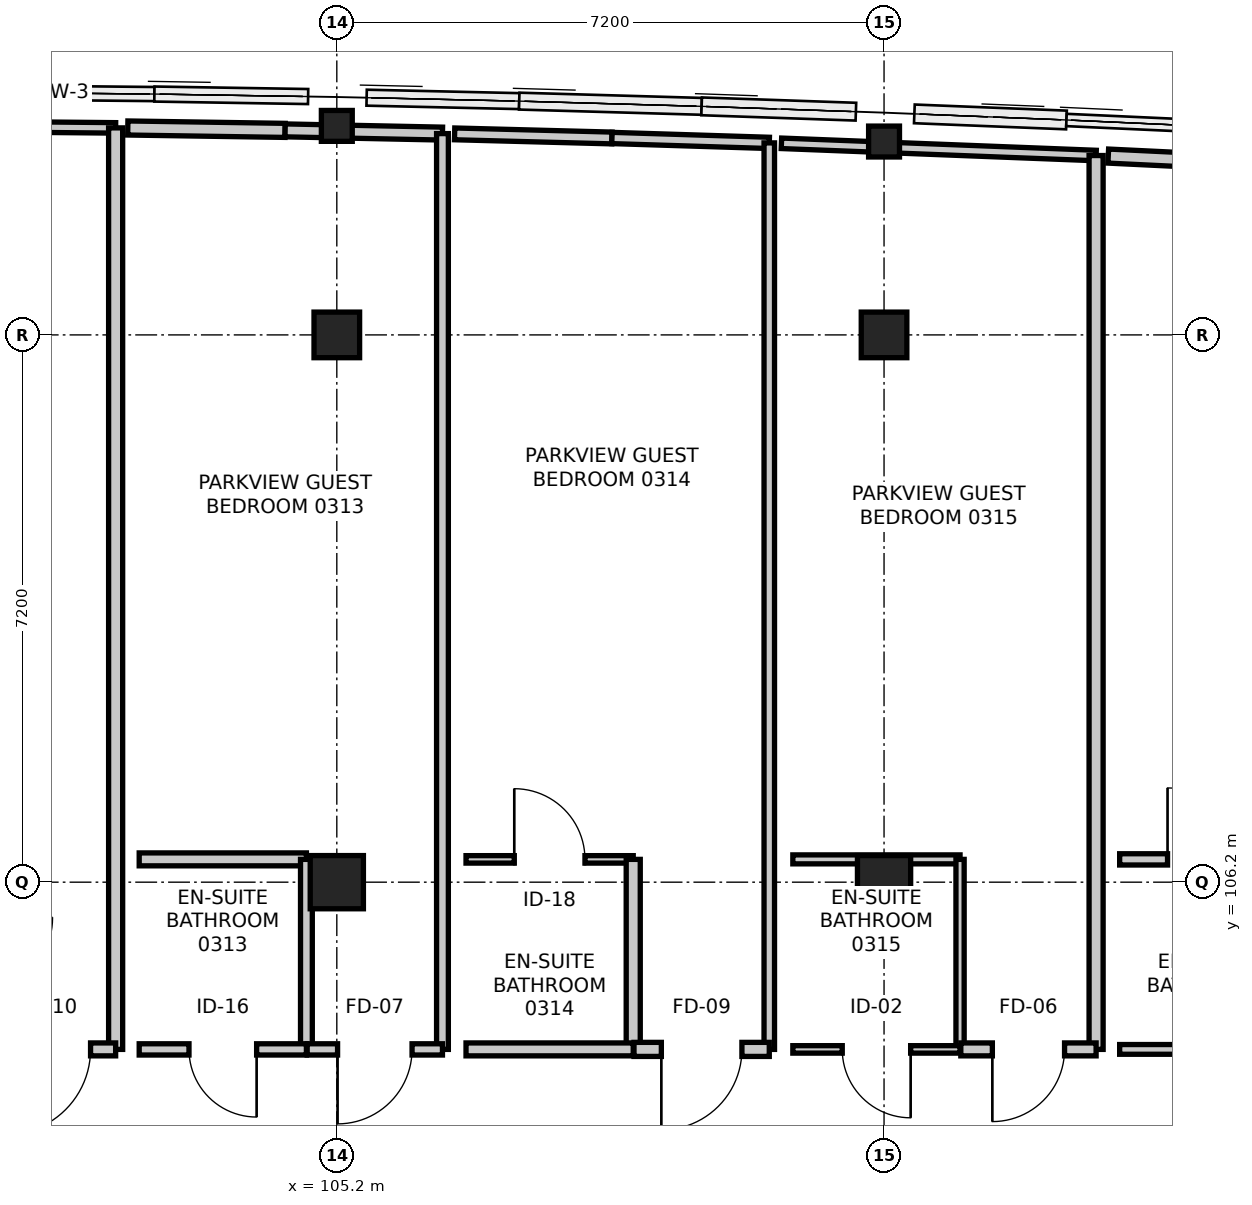
"""IFC4 building model, lengths in metres.
Left out: names, types, materials, properties, quantities, classifications, styles, units other than length and angle.
Written with IfcOpenShell. Run it as: python <this file> out.ifc"""

import sys

from ifc_helpers import new_model, si_unit, direction, frame, frame_2d, origin, origin_2d, place, context, subcontext, project, spatial, rectangle, hollow_circle, extrude, element, fill, save


model = new_model("IFC4")
c1 = context("Model", 3, precision=1e-05, world=origin(), true_north=direction((0.0, 1.0)))
c2 = subcontext(c1, "Body", "Model", "MODEL_VIEW")
j1 = project(units=[si_unit("LENGTHUNIT", "METRE"), si_unit("PLANEANGLEUNIT", "RADIAN")], contexts=[c1])
p1 = place(None, origin())
s1 = spatial("IfcSite", under=j1, at=p1, CompositionType="ELEMENT")
p2 = place(p1, origin())
s2 = spatial("IfcBuilding", under=s1, at=p2, CompositionType="ELEMENT")
p3 = place(p2, frame((0.0, 0.0, 15.0)))
s3 = spatial("IfcBuildingStorey", under=s2, at=p3, CompositionType="ELEMENT", Elevation=15.0)
p4 = place(p3, frame((105.2, 106.2, 0.0), z_axis=(0.0, 0.0, 1.0), x_axis=(1.0, 0.0, 0.0)))
e1 = element("IfcColumn", 1, at=p4, inside=s3, PredefinedType="COLUMN", context=c2, shape_type="SweptSolid", body=[
    extrude(rectangle(XDim=0.7, YDim=0.7, at=origin_2d()), origin(), (0.0, 0.0, 1.0), 4.2),
])
p5 = place(p3, frame((105.2, 113.4, 0.0), z_axis=(0.0, 0.0, 1.0), x_axis=(1.0, 0.0, 0.0)))
e2 = element("IfcColumn", 2, at=p5, inside=s3, PredefinedType="COLUMN", context=c2, shape_type="SweptSolid", body=[
    extrude(rectangle(XDim=0.6, YDim=0.6, at=origin_2d()), origin(), (0.0, 0.0, 1.0), 4.2),
])
p6 = place(p3, frame((105.2, 116.15, 0.0), z_axis=(0.0, 0.0, 1.0), x_axis=(1.0, 0.0, 0.0)))
e3 = element("IfcColumn", 3, at=p6, inside=s3, PredefinedType="COLUMN", context=c2, shape_type="SweptSolid", body=[
    extrude(hollow_circle(Radius=0.203, WallThickness=0.02, at=origin_2d()), origin(), (0.0, 0.0, 1.0), 4.2),
])
p7 = place(p3, frame((112.4, 106.2, 0.0), z_axis=(0.0, 0.0, 1.0), x_axis=(1.0, 0.0, 0.0)))
e4 = element("IfcColumn", 4, at=p7, inside=s3, PredefinedType="COLUMN", context=c2, shape_type="SweptSolid", body=[
    extrude(rectangle(XDim=0.7, YDim=0.7, at=origin_2d()), origin(), (0.0, 0.0, 1.0), 4.2),
])
p8 = place(p3, frame((112.4, 113.4, 0.0), z_axis=(0.0, 0.0, 1.0), x_axis=(1.0, 0.0, 0.0)))
e5 = element("IfcColumn", 5, at=p8, inside=s3, PredefinedType="COLUMN", context=c2, shape_type="SweptSolid", body=[
    extrude(rectangle(XDim=0.6, YDim=0.6, at=origin_2d()), origin(), (0.0, 0.0, 1.0), 4.2),
])
p9 = place(p3, frame((112.4, 115.944, 0.0), z_axis=(0.0, 0.0, 1.0), x_axis=(1.0, 0.0, 0.0)))
e6 = element("IfcColumn", 6, at=p9, inside=s3, PredefinedType="COLUMN", context=c2, shape_type="SweptSolid", body=[
    extrude(hollow_circle(Radius=0.203, WallThickness=0.02, at=origin_2d()), origin(), (0.0, 0.0, 1.0), 4.2),
])
p10 = place(p3, frame((100.22, 116.143, 0.0), z_axis=(0.0, 0.0, 1.0), x_axis=(0.999957690063, -0.009198808801, 0.0)))
e7 = element("IfcWall", 7, at=p10, inside=s3, PredefinedType="PARTITIONING", context=c2, shape_type="SweptSolid", body=[
    extrude(rectangle(XDim=2.07, YDim=0.138, at=frame_2d((1.035, 0.0))), origin(), (0.0, 0.0, 1.0), 3.516),
])
p11 = place(p3, frame((102.29, 116.124, 0.0), z_axis=(0.0, 0.0, 1.0), x_axis=(0.0, -1.0, 0.0)))
e8 = element("IfcWall", 8, at=p11, inside=s3, PredefinedType="PARTITIONING", context=c2, shape_type="SweptSolid", body=[
    extrude(rectangle(XDim=12.124, YDim=0.185, at=frame_2d((6.062, 0.0))), origin(), (0.0, 0.0, 1.0), 3.325),
])
p12 = place(p3, frame((102.29, 104.0, 0.0), z_axis=(0.0, 0.0, 1.0), x_axis=(-1.0, 0.0, 0.0)))
e9 = element("IfcWall", 9, at=p12, inside=s3, PredefinedType="PARTITIONING", context=c2, shape_type="SweptSolid", body=[
    extrude(rectangle(XDim=1.78, YDim=0.17, at=frame_2d((0.89, 0.0))), origin(), (0.0, 0.0, 1.0), 3.94),
])
p13 = place(p12, frame((0.33, 0.0, 0.0)))
e10 = element("IfcOpeningElement", 10, at=p13, cuts=e9, PredefinedType="OPENING", context=c2, shape_type="SweptSolid", body=[
    extrude(rectangle(XDim=1.12, YDim=2.2, at=frame_2d((0.56, 1.1))), frame((0.0, 0.095, 0.0), z_axis=(0.0, -1.0, 0.0), x_axis=(1.0, 0.0, 0.0)), (0.0, 0.0, 1.0), 0.19),
])
p14 = place(p3, frame((102.6, 106.5, 0.0), z_axis=(0.0, 0.0, 1.0), x_axis=(1.0, 0.0, 0.0)))
e11 = element("IfcWall", 11, at=p14, inside=s3, PredefinedType="PARTITIONING", context=c2, shape_type="SweptSolid", body=[
    extrude(rectangle(XDim=2.2, YDim=0.17, at=frame_2d((1.1, 0.0))), origin(), (0.0, 0.0, 1.0), 3.325),
])
p15 = place(p3, frame((104.8, 106.5, 0.0), z_axis=(0.0, 0.0, 1.0), x_axis=(0.0, -1.0, 0.0)))
e12 = element("IfcWall", 12, at=p15, inside=s3, PredefinedType="PARTITIONING", context=c2, shape_type="SweptSolid", body=[
    extrude(rectangle(XDim=2.5, YDim=0.155, at=frame_2d((1.25, 0.0))), origin(), (0.0, 0.0, 1.0), 3.325),
])
p16 = place(p3, frame((104.8, 104.0, 0.0), z_axis=(0.0, 0.0, 1.0), x_axis=(-1.0, 0.0, 0.0)))
e13 = element("IfcWall", 13, at=p16, inside=s3, PredefinedType="PARTITIONING", context=c2, shape_type="SweptSolid", body=[
    extrude(rectangle(XDim=2.2, YDim=0.148, at=frame_2d((1.1, 0.0))), origin(), (0.0, 0.0, 1.0), 3.94),
])
p17 = place(p16, frame((0.655, 0.0, 0.0)))
e14 = element("IfcOpeningElement", 14, at=p17, cuts=e13, PredefinedType="OPENING", context=c2, shape_type="SweptSolid", body=[
    extrude(rectangle(XDim=0.89, YDim=2.09, at=frame_2d((0.445, 1.045))), frame((0.0, 0.084, 0.0), z_axis=(0.0, -1.0, 0.0), x_axis=(1.0, 0.0, 0.0)), (0.0, 0.0, 1.0), 0.168),
])
p18 = place(p3, frame((102.45, 116.122, 0.0), z_axis=(0.0, 0.0, 1.0), x_axis=(0.999886073055, -0.015094399971, 0.0)))
e15 = element("IfcWall", 15, at=p18, inside=s3, PredefinedType="PARTITIONING", context=c2, shape_type="SweptSolid", body=[
    extrude(rectangle(XDim=2.07, YDim=0.185, at=frame_2d((1.035, 0.0))), origin(), (0.0, 0.0, 1.0), 3.516),
])
p19 = place(p3, frame((104.52, 116.091, 0.0), z_axis=(0.0, 0.0, 1.0), x_axis=(0.999789504853, -0.020516968256, 0.0)))
e16 = element("IfcWall", 16, at=p19, inside=s3, PredefinedType="PARTITIONING", context=c2, shape_type="SweptSolid", body=[
    extrude(rectangle(XDim=2.071, YDim=0.17, at=frame_2d((1.035, 0.0))), origin(), (0.0, 0.0, 1.0), 3.516),
])
p20 = place(p3, frame((106.59, 116.048, 0.0), z_axis=(0.0, 0.0, 1.0), x_axis=(0.0, -1.0, 0.0)))
e17 = element("IfcWall", 17, at=p20, inside=s3, PredefinedType="PARTITIONING", context=c2, shape_type="SweptSolid", body=[
    extrude(rectangle(XDim=12.048, YDim=0.155, at=frame_2d((6.024, 0.0))), origin(), (0.0, 0.0, 1.0), 3.325),
])
p21 = place(p3, frame((106.59, 104.0, 0.0), z_axis=(0.0, 0.0, 1.0), x_axis=(-1.0, 0.0, 0.0)))
e18 = element("IfcWall", 18, at=p21, inside=s3, PredefinedType="PARTITIONING", context=c2, shape_type="SweptSolid", body=[
    extrude(rectangle(XDim=1.78, YDim=0.148, at=frame_2d((0.89, 0.0))), origin(), (0.0, 0.0, 1.0), 3.275),
])
p22 = place(p21, frame((0.4, 0.0, 0.0)))
e19 = element("IfcOpeningElement", 19, at=p22, cuts=e18, PredefinedType="OPENING", context=c2, shape_type="SweptSolid", body=[
    extrude(rectangle(XDim=0.98, YDim=2.15, at=frame_2d((0.49, 1.075))), frame((0.0, 0.084, 0.0), z_axis=(0.0, -1.0, 0.0), x_axis=(1.0, 0.0, 0.0)), (0.0, 0.0, 1.0), 0.168),
])
p23 = place(p3, frame((106.9, 106.5, 0.0), z_axis=(0.0, 0.0, 1.0), x_axis=(1.0, 0.0, 0.0)))
e20 = element("IfcWall", 20, at=p23, inside=s3, PredefinedType="PARTITIONING", context=c2, shape_type="SweptSolid", body=[
    extrude(rectangle(XDim=2.2, YDim=0.098, at=frame_2d((1.1, 0.0))), origin(), (0.0, 0.0, 1.0), 3.94),
])
p24 = place(p23, frame((0.635, 0.0, 0.0)))
e21 = element("IfcOpeningElement", 21, at=p24, cuts=e20, PredefinedType="OPENING", context=c2, shape_type="SweptSolid", body=[
    extrude(rectangle(XDim=0.93, YDim=2.13, at=frame_2d((0.465, 1.065))), frame((0.0, 0.059, 0.0), z_axis=(0.0, -1.0, 0.0), x_axis=(1.0, 0.0, 0.0)), (0.0, 0.0, 1.0), 0.118),
])
p25 = place(p3, frame((109.1, 106.5, 0.0), z_axis=(0.0, 0.0, 1.0), x_axis=(0.0, -1.0, 0.0)))
e22 = element("IfcWall", 22, at=p25, inside=s3, PredefinedType="PARTITIONING", context=c2, shape_type="SweptSolid", body=[
    extrude(rectangle(XDim=2.5, YDim=0.185, at=frame_2d((1.25, 0.0))), origin(), (0.0, 0.0, 1.0), 3.325),
])
p26 = place(p3, frame((109.1, 104.0, 0.0), z_axis=(0.0, 0.0, 1.0), x_axis=(-1.0, 0.0, 0.0)))
e23 = element("IfcWall", 23, at=p26, inside=s3, PredefinedType="PARTITIONING", context=c2, shape_type="SweptSolid", body=[
    extrude(rectangle(XDim=2.2, YDim=0.17, at=frame_2d((1.1, 0.0))), origin(), (0.0, 0.0, 1.0), 3.94),
])
p27 = place(p3, frame((106.75, 116.045, 0.0), z_axis=(0.0, 0.0, 1.0), x_axis=(0.999657418847, -0.026173363249, 0.0)))
e24 = element("IfcWall", 24, at=p27, inside=s3, PredefinedType="PARTITIONING", context=c2, shape_type="SweptSolid", body=[
    extrude(rectangle(XDim=2.071, YDim=0.155, at=frame_2d((1.035, 0.0))), origin(), (0.0, 0.0, 1.0), 3.516),
])
p28 = place(p3, frame((108.82, 115.991, 0.0), z_axis=(0.0, 0.0, 1.0), x_axis=(0.999515520579, -0.031124333266, 0.0)))
e25 = element("IfcWall", 25, at=p28, inside=s3, PredefinedType="PARTITIONING", context=c2, shape_type="SweptSolid", body=[
    extrude(rectangle(XDim=2.071, YDim=0.148, at=frame_2d((1.035, 0.0))), origin(), (0.0, 0.0, 1.0), 3.516),
])
p29 = place(p3, frame((110.89, 115.926, 0.0), z_axis=(0.0, 0.0, 1.0), x_axis=(0.0, -1.0, 0.0)))
e26 = element("IfcWall", 26, at=p29, inside=s3, PredefinedType="PARTITIONING", context=c2, shape_type="SweptSolid", body=[
    extrude(rectangle(XDim=11.926, YDim=0.138, at=frame_2d((5.963, 0.0))), origin(), (0.0, 0.0, 1.0), 3.325),
])
p30 = place(p3, frame((110.89, 104.0, 0.0), z_axis=(0.0, 0.0, 1.0), x_axis=(-1.0, 0.0, 0.0)))
e27 = element("IfcWall", 27, at=p30, inside=s3, PredefinedType="PARTITIONING", context=c2, shape_type="SweptSolid", body=[
    extrude(rectangle(XDim=1.78, YDim=0.185, at=frame_2d((0.89, 0.0))), origin(), (0.0, 0.0, 1.0), 3.94),
])
p31 = place(p30, frame((0.36, 0.0, 0.0)))
e28 = element("IfcOpeningElement", 28, at=p31, cuts=e27, PredefinedType="OPENING", context=c2, shape_type="SweptSolid", body=[
    extrude(rectangle(XDim=1.06, YDim=2.2, at=frame_2d((0.53, 1.1))), frame((0.0, 0.103, 0.0), z_axis=(0.0, -1.0, 0.0), x_axis=(1.0, 0.0, 0.0)), (0.0, 0.0, 1.0), 0.205),
])
p32 = place(p3, frame((111.2, 106.5, 0.0), z_axis=(0.0, 0.0, 1.0), x_axis=(1.0, 0.0, 0.0)))
e29 = element("IfcWall", 29, at=p32, inside=s3, PredefinedType="PARTITIONING", context=c2, shape_type="SweptSolid", body=[
    extrude(rectangle(XDim=2.2, YDim=0.118, at=frame_2d((1.1, 0.0))), origin(), (0.0, 0.0, 1.0), 3.275),
])
p33 = place(p3, frame((113.4, 106.5, 0.0), z_axis=(0.0, 0.0, 1.0), x_axis=(0.0, -1.0, 0.0)))
e30 = element("IfcWall", 30, at=p33, inside=s3, PredefinedType="PARTITIONING", context=c2, shape_type="SweptSolid", body=[
    extrude(rectangle(XDim=2.5, YDim=0.108, at=frame_2d((1.25, 0.0))), origin(), (0.0, 0.0, 1.0), 3.325),
])
p34 = place(p3, frame((113.4, 104.0, 0.0), z_axis=(0.0, 0.0, 1.0), x_axis=(-1.0, 0.0, 0.0)))
e31 = element("IfcWall", 31, at=p34, inside=s3, PredefinedType="PARTITIONING", context=c2, shape_type="SweptSolid", body=[
    extrude(rectangle(XDim=2.2, YDim=0.098, at=frame_2d((1.1, 0.0))), origin(), (0.0, 0.0, 1.0), 3.275),
])
p35 = place(p34, frame((0.65, 0.0, 0.0)))
e32 = element("IfcOpeningElement", 32, at=p35, cuts=e31, PredefinedType="OPENING", context=c2, shape_type="SweptSolid", body=[
    extrude(rectangle(XDim=0.9, YDim=2.08, at=frame_2d((0.45, 1.04))), frame((0.0, 0.059, 0.0), z_axis=(0.0, -1.0, 0.0), x_axis=(1.0, 0.0, 0.0)), (0.0, 0.0, 1.0), 0.118),
])
p36 = place(p3, frame((111.05, 115.921, 0.0), z_axis=(0.0, 0.0, 1.0), x_axis=(0.999245687705, -0.038833691584, 0.0)))
e33 = element("IfcWall", 33, at=p36, inside=s3, PredefinedType="PARTITIONING", context=c2, shape_type="SweptSolid", body=[
    extrude(rectangle(XDim=4.143, YDim=0.138, at=frame_2d((2.072, 0.0))), origin(), (0.0, 0.0, 1.0), 3.516),
])
p37 = place(p3, frame((115.19, 115.76, 0.0), z_axis=(0.0, 0.0, 1.0), x_axis=(0.0, -1.0, 0.0)))
e34 = element("IfcWall", 34, at=p37, inside=s3, PredefinedType="PARTITIONING", context=c2, shape_type="SweptSolid", body=[
    extrude(rectangle(XDim=11.76, YDim=0.185, at=frame_2d((5.88, 0.0))), origin(), (0.0, 0.0, 1.0), 3.325),
])
p38 = place(p3, frame((115.19, 104.0, 0.0), z_axis=(0.0, 0.0, 1.0), x_axis=(-1.0, 0.0, 0.0)))
e35 = element("IfcWall", 35, at=p38, inside=s3, PredefinedType="PARTITIONING", context=c2, shape_type="SweptSolid", body=[
    extrude(rectangle(XDim=1.78, YDim=0.17, at=frame_2d((0.89, 0.0))), origin(), (0.0, 0.0, 1.0), 3.94),
])
p39 = place(p38, frame((0.415, 0.0, 0.0)))
e36 = element("IfcOpeningElement", 36, at=p39, cuts=e35, PredefinedType="OPENING", context=c2, shape_type="SweptSolid", body=[
    extrude(rectangle(XDim=0.95, YDim=2.1, at=frame_2d((0.475, 1.05))), frame((0.0, 0.095, 0.0), z_axis=(0.0, -1.0, 0.0), x_axis=(1.0, 0.0, 0.0)), (0.0, 0.0, 1.0), 0.19),
])
p40 = place(p3, frame((115.5, 106.5, 0.0), z_axis=(0.0, 0.0, 1.0), x_axis=(1.0, 0.0, 0.0)))
e37 = element("IfcWall", 37, at=p40, inside=s3, PredefinedType="PARTITIONING", context=c2, shape_type="SweptSolid", body=[
    extrude(rectangle(XDim=2.2, YDim=0.148, at=frame_2d((1.1, 0.0))), origin(), (0.0, 0.0, 1.0), 3.94),
])
p41 = place(p40, frame((0.63, 0.0, 0.0)))
e38 = element("IfcOpeningElement", 38, at=p41, cuts=e37, PredefinedType="OPENING", context=c2, shape_type="SweptSolid", body=[
    extrude(rectangle(XDim=0.94, YDim=2.12, at=frame_2d((0.47, 1.06))), frame((0.0, 0.084, 0.0), z_axis=(0.0, -1.0, 0.0), x_axis=(1.0, 0.0, 0.0)), (0.0, 0.0, 1.0), 0.168),
])
p42 = place(p3, frame((117.7, 104.0, 0.0), z_axis=(0.0, 0.0, 1.0), x_axis=(-1.0, 0.0, 0.0)))
e39 = element("IfcWall", 39, at=p42, inside=s3, PredefinedType="PARTITIONING", context=c2, shape_type="SweptSolid", body=[
    extrude(rectangle(XDim=2.2, YDim=0.128, at=frame_2d((1.1, 0.0))), origin(), (0.0, 0.0, 1.0), 3.94),
])
p43 = place(p3, frame((115.35, 115.753, 0.0), z_axis=(0.0, 0.0, 1.0), x_axis=(0.99884141987, -0.048122946217, 0.0)))
e40 = element("IfcWall", 40, at=p43, inside=s3, PredefinedType="PARTITIONING", context=c2, shape_type="SweptSolid", body=[
    extrude(rectangle(XDim=3.785, YDim=0.185, at=frame_2d((1.892, 0.0))), origin(), (0.0, 0.0, 1.0), 3.516),
])
p44 = place(p13, origin())
e41 = element("IfcDoor", 41, at=p44, inside=s3, OperationType="SINGLE_SWING_RIGHT", PredefinedType="DOOR", context=c2, shape_type="SweptSolid", body=[
    extrude(rectangle(XDim=1.12, YDim=2.2, at=frame_2d((0.56, 1.1))), frame((0.0, 0.025, 0.0), z_axis=(0.0, -1.0, 0.0), x_axis=(1.0, 0.0, 0.0)), (0.0, 0.0, 1.0), 0.05),
])
fill(e10, e41)
p45 = place(p17, origin())
e42 = element("IfcDoor", 42, at=p45, inside=s3, OperationType="SINGLE_SWING_LEFT", PredefinedType="DOOR", context=c2, shape_type="SweptSolid", body=[
    extrude(rectangle(XDim=0.89, YDim=2.09, at=frame_2d((0.445, 1.045))), frame((0.0, 0.025, 0.0), z_axis=(0.0, -1.0, 0.0), x_axis=(1.0, 0.0, 0.0)), (0.0, 0.0, 1.0), 0.05),
])
fill(e14, e42)
p46 = place(p22, origin())
e43 = element("IfcDoor", 43, at=p46, inside=s3, OperationType="SINGLE_SWING_RIGHT", PredefinedType="DOOR", context=c2, shape_type="SweptSolid", body=[
    extrude(rectangle(XDim=0.98, YDim=2.15, at=frame_2d((0.49, 1.075))), frame((0.0, 0.025, 0.0), z_axis=(0.0, -1.0, 0.0), x_axis=(1.0, 0.0, 0.0)), (0.0, 0.0, 1.0), 0.05),
])
fill(e19, e43)
p47 = place(p24, origin())
e44 = element("IfcDoor", 44, at=p47, inside=s3, OperationType="SINGLE_SWING_LEFT", PredefinedType="DOOR", context=c2, shape_type="SweptSolid", body=[
    extrude(rectangle(XDim=0.93, YDim=2.13, at=frame_2d((0.465, 1.065))), frame((0.0, 0.025, 0.0), z_axis=(0.0, -1.0, 0.0), x_axis=(1.0, 0.0, 0.0)), (0.0, 0.0, 1.0), 0.05),
])
fill(e21, e44)
p48 = place(p31, origin())
e45 = element("IfcDoor", 45, at=p48, inside=s3, OperationType="SINGLE_SWING_RIGHT", PredefinedType="DOOR", context=c2, shape_type="SweptSolid", body=[
    extrude(rectangle(XDim=1.06, YDim=2.2, at=frame_2d((0.53, 1.1))), frame((0.0, 0.025, 0.0), z_axis=(0.0, -1.0, 0.0), x_axis=(1.0, 0.0, 0.0)), (0.0, 0.0, 1.0), 0.05),
])
fill(e28, e45)
p49 = place(p35, origin())
e46 = element("IfcDoor", 46, at=p49, inside=s3, OperationType="SINGLE_SWING_LEFT", PredefinedType="DOOR", context=c2, shape_type="SweptSolid", body=[
    extrude(rectangle(XDim=0.9, YDim=2.08, at=frame_2d((0.45, 1.04))), frame((0.0, 0.025, 0.0), z_axis=(0.0, -1.0, 0.0), x_axis=(1.0, 0.0, 0.0)), (0.0, 0.0, 1.0), 0.05),
])
fill(e32, e46)
p50 = place(p39, origin())
e47 = element("IfcDoor", 47, at=p50, inside=s3, OperationType="SINGLE_SWING_RIGHT", PredefinedType="DOOR", context=c2, shape_type="SweptSolid", body=[
    extrude(rectangle(XDim=0.95, YDim=2.1, at=frame_2d((0.475, 1.05))), frame((0.0, 0.025, 0.0), z_axis=(0.0, -1.0, 0.0), x_axis=(1.0, 0.0, 0.0)), (0.0, 0.0, 1.0), 0.05),
])
fill(e36, e47)
p51 = place(p41, origin())
e48 = element("IfcDoor", 48, at=p51, inside=s3, OperationType="SINGLE_SWING_LEFT", PredefinedType="DOOR", context=c2, shape_type="SweptSolid", body=[
    extrude(rectangle(XDim=0.94, YDim=2.12, at=frame_2d((0.47, 1.06))), frame((0.0, 0.025, 0.0), z_axis=(0.0, -1.0, 0.0), x_axis=(1.0, 0.0, 0.0)), (0.0, 0.0, 1.0), 0.05),
])
fill(e38, e48)
save(model, sys.argv[1])
